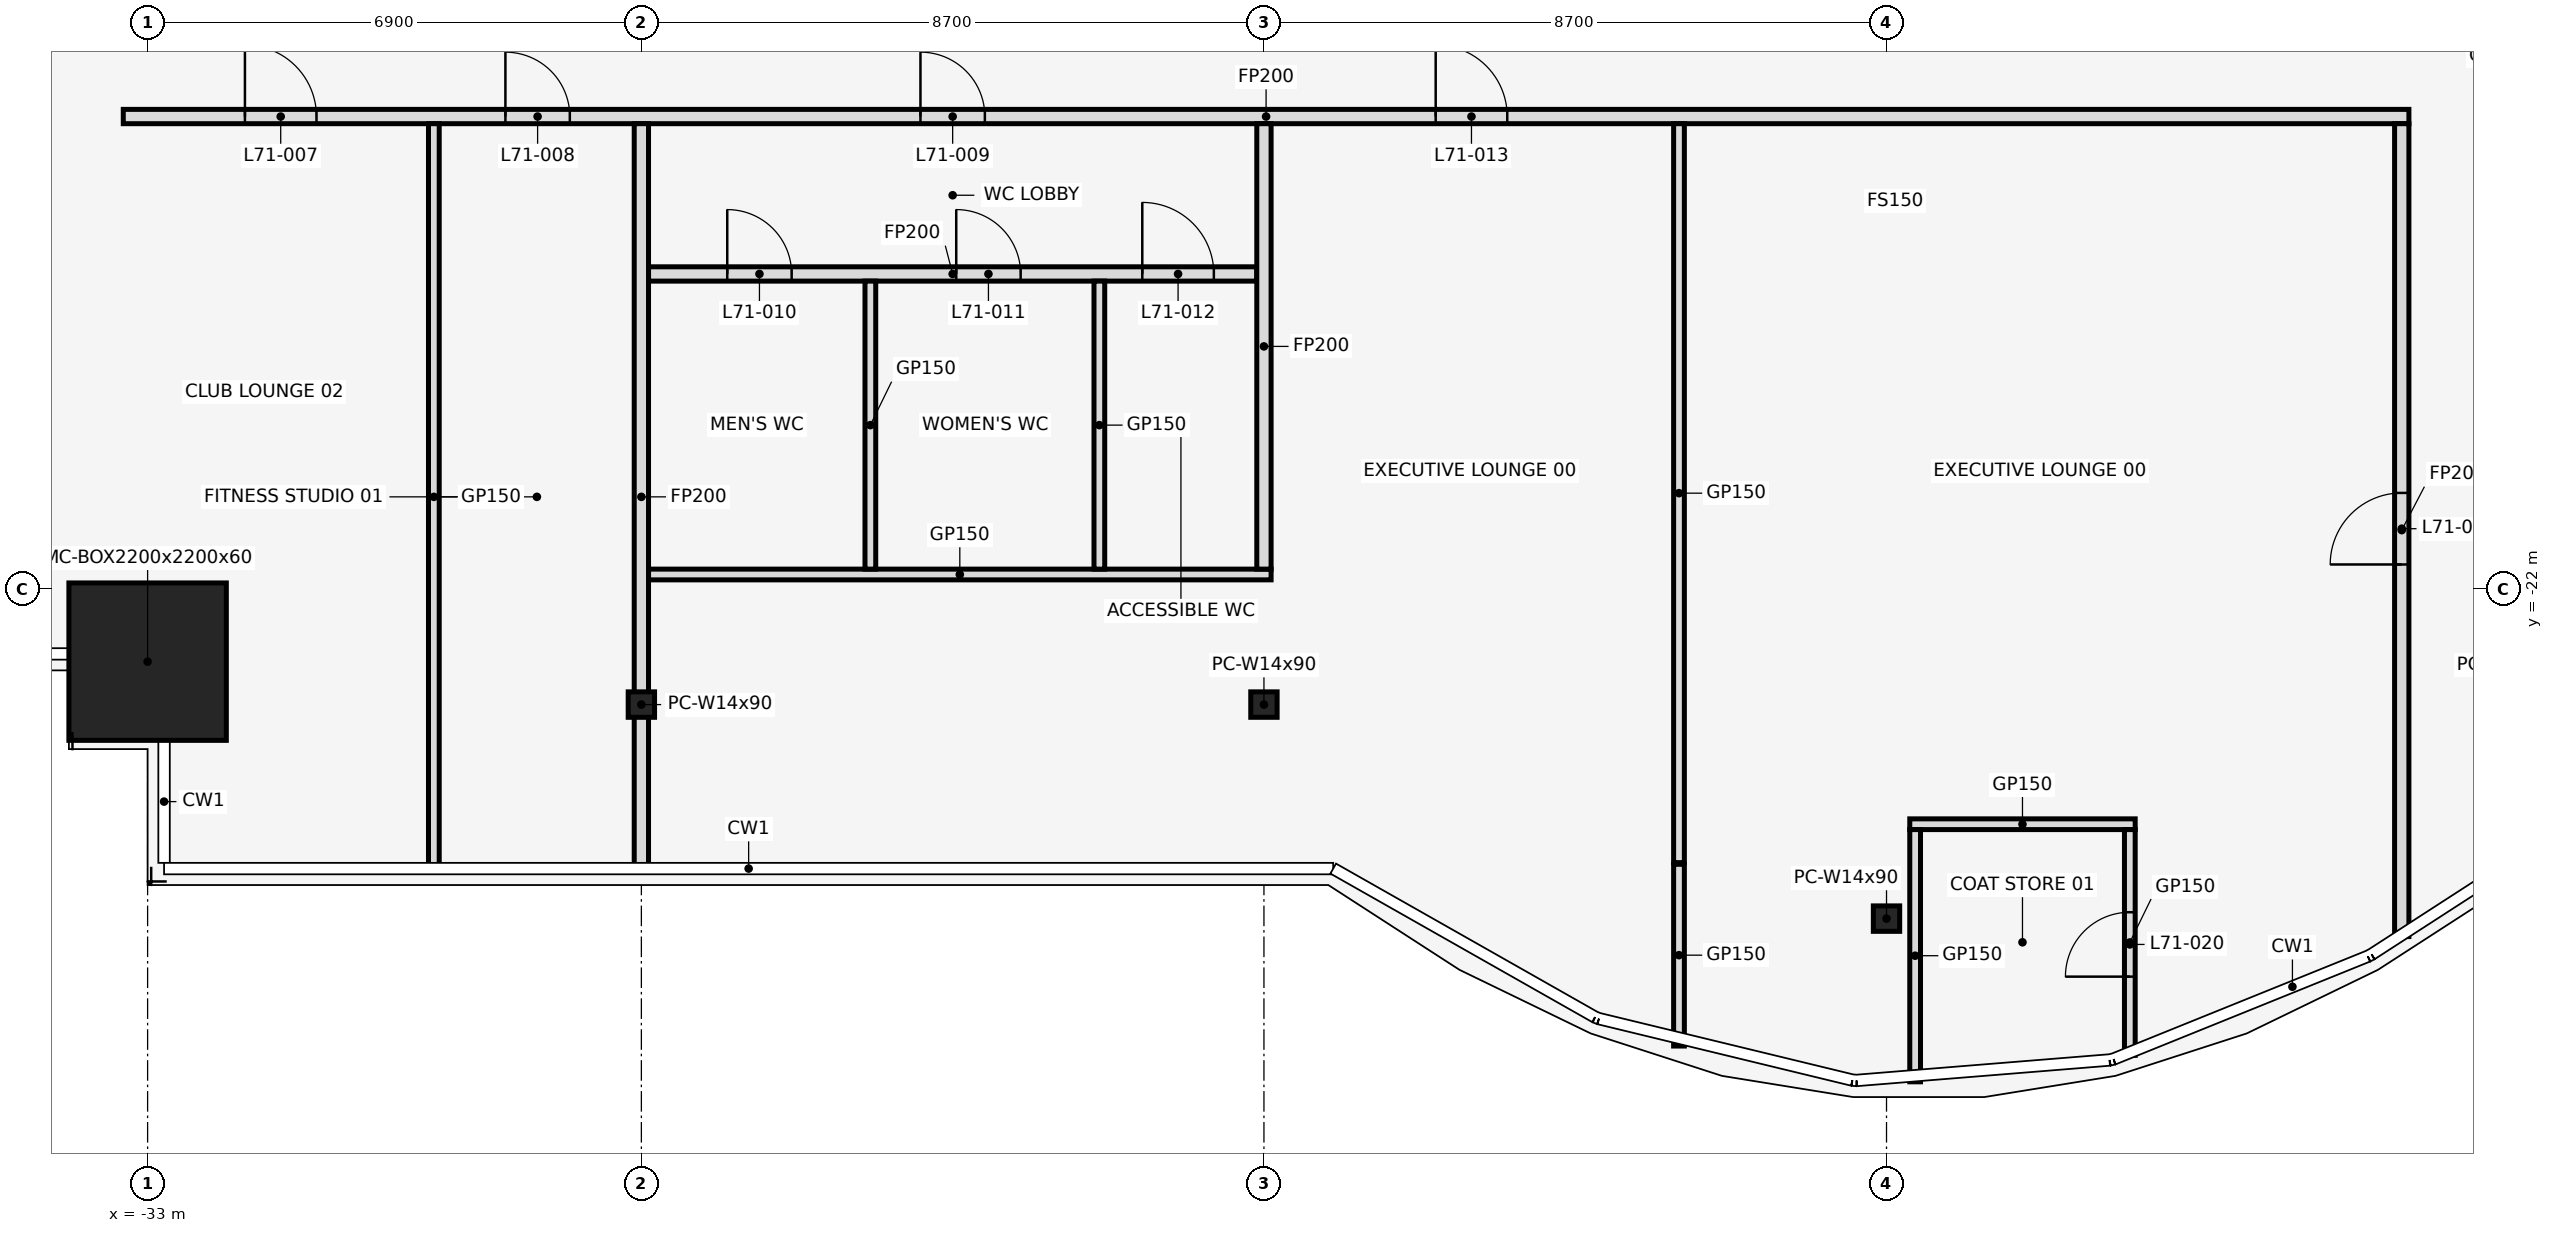
"""IFC4 building model, lengths in metres.
Left out: names, types, materials, properties, quantities, classifications, styles, units other than length and angle.
Written with IfcOpenShell. Run it as: python <this file> out.ifc"""

import sys

from ifc_helpers import new_model, si_unit, direction, frame, frame_2d, origin, origin_2d, place, context, subcontext, project, spatial, rectangle, hollow_rectangle, i_section, extrude, element, fill, save


model = new_model("IFC4")
c1 = context("Model", 3, precision=1e-05, world=origin(), true_north=direction((0.0, 1.0)))
c2 = subcontext(c1, "Body", "Model", "MODEL_VIEW")
j1 = project(units=[si_unit("LENGTHUNIT", "METRE"), si_unit("PLANEANGLEUNIT", "RADIAN")], contexts=[c1])
p1 = place(None, origin())
s1 = spatial("IfcSite", under=j1, at=p1, CompositionType="ELEMENT")
p2 = place(p1, origin())
s2 = spatial("IfcBuilding", under=s1, at=p2, CompositionType="ELEMENT")
p3 = place(p2, frame((0.0, 0.0, 315.5)))
s3 = spatial("IfcBuildingStorey", under=s2, at=p3, CompositionType="ELEMENT", Elevation=315.5)
p4 = place(p3, frame((-33.0, -23.018, 0.0), z_axis=(0.0, 0.0, 1.0), x_axis=(1.0, 0.0, 0.0)))
e1 = element("IfcColumn", 1, at=p4, inside=s3, PredefinedType="COLUMN", context=c2, shape_type="SweptSolid", body=[
    extrude(hollow_rectangle(XDim=2.2, YDim=2.2, WallThickness=0.06, at=origin_2d()), origin(), (0.0, 0.0, 1.0), 4.5),
])
for number, where, z_axis, x_axis in (
    (2, (-26.1, -23.618, 0.0), (0.0, 0.0, 1.0), (1.0, 0.0, 0.0)),
    (3, (-17.4, -23.618, 0.0), (0.0, 0.0, 1.0), (1.0, 0.0, 0.0)),
    (4, (-8.7, -26.609, 0.0), (0.0, 0.0, 1.0), (1.0, 0.0, 0.0)),
):
    element("IfcColumn", number, at=place(p3, frame(where, z_axis=z_axis, x_axis=x_axis)), inside=s3, PredefinedType="COLUMN", context=c2, shape_type="SweptSolid", body=[
        extrude(i_section(OverallWidth=0.368, OverallDepth=0.356, WebThickness=0.011, FlangeThickness=0.018, at=origin_2d()), origin(), (0.0, 0.0, 1.0), 4.5),
    ])
p5 = place(p3, frame((-8.375, -25.29, 0.0), z_axis=(0.0, 0.0, 1.0), x_axis=(1.0, 0.0, 0.0)))
e5 = element("IfcWall", 5, at=p5, inside=s3, PredefinedType="PARTITIONING", context=c2, shape_type="SweptSolid", body=[
    extrude(rectangle(XDim=3.15, YDim=0.15, at=frame_2d((1.575, 0.0))), origin(), (0.0, 0.0, 1.0), 3.418),
])
p6 = place(p3, frame((-26.0, -21.8, 0.0), z_axis=(0.0, 0.0, 1.0), x_axis=(1.0, 0.0, 0.0)))
e6 = element("IfcWall", 6, at=p6, inside=s3, PredefinedType="PARTITIONING", context=c2, shape_type="SweptSolid", body=[
    extrude(rectangle(XDim=8.7, YDim=0.15, at=frame_2d((4.35, 0.0))), origin(), (0.0, 0.0, 1.0), 3.418),
])
p7 = place(p3, frame((-26.0, -17.6, 0.0), z_axis=(0.0, 0.0, 1.0), x_axis=(1.0, 0.0, 0.0)))
e7 = element("IfcWall", 7, at=p7, inside=s3, PredefinedType="PARTITIONING", context=c2, shape_type="SweptSolid", body=[
    extrude(rectangle(XDim=8.5, YDim=0.2, at=frame_2d((4.25, 0.0))), origin(), (0.0, 0.0, 1.0), 3.418),
])
p8 = place(p7, frame((1.1, 0.0, 0.0)))
e8 = element("IfcOpeningElement", 8, at=p8, cuts=e7, PredefinedType="OPENING", context=c2, shape_type="SweptSolid", body=[
    extrude(rectangle(XDim=0.9, YDim=2.1, at=frame_2d((0.45, 1.05))), frame((0.0, 0.112, 0.0), z_axis=(0.0, -1.0, 0.0), x_axis=(1.0, 0.0, 0.0)), (0.0, 0.0, 1.0), 0.224),
])
p9 = place(p7, frame((4.3, 0.0, 0.0)))
e9 = element("IfcOpeningElement", 9, at=p9, cuts=e7, PredefinedType="OPENING", context=c2, shape_type="SweptSolid", body=[
    extrude(rectangle(XDim=0.9, YDim=2.1, at=frame_2d((0.45, 1.05))), frame((0.0, 0.112, 0.0), z_axis=(0.0, -1.0, 0.0), x_axis=(1.0, 0.0, 0.0)), (0.0, 0.0, 1.0), 0.224),
])
p10 = place(p7, frame((6.9, 0.0, 0.0)))
e10 = element("IfcOpeningElement", 10, at=p10, cuts=e7, PredefinedType="OPENING", context=c2, shape_type="SweptSolid", body=[
    extrude(rectangle(XDim=1.0, YDim=2.1, at=frame_2d((0.5, 1.05))), frame((0.0, 0.112, 0.0), z_axis=(0.0, -1.0, 0.0), x_axis=(1.0, 0.0, 0.0)), (0.0, 0.0, 1.0), 0.224),
])
p11 = place(p3, frame((-33.34, -15.4, 0.0), z_axis=(0.0, 0.0, 1.0), x_axis=(1.0, 0.0, 0.0)))
e11 = element("IfcWall", 11, at=p11, inside=s3, PredefinedType="PARTITIONING", context=c2, shape_type="SweptSolid", body=[
    extrude(rectangle(XDim=31.94, YDim=0.2, at=frame_2d((15.97, 0.0))), origin(), (0.0, 0.0, 1.0), 3.418),
])
p12 = place(p11, frame((1.7, 0.0, 0.0)))
e12 = element("IfcOpeningElement", 12, at=p12, cuts=e11, PredefinedType="OPENING", context=c2, shape_type="SweptSolid", body=[
    extrude(rectangle(XDim=1.0, YDim=2.1, at=frame_2d((0.5, 1.05))), frame((0.0, 0.112, 0.0), z_axis=(0.0, -1.0, 0.0), x_axis=(1.0, 0.0, 0.0)), (0.0, 0.0, 1.0), 0.224),
])
p13 = place(p11, frame((5.34, 0.0, 0.0)))
e13 = element("IfcOpeningElement", 13, at=p13, cuts=e11, PredefinedType="OPENING", context=c2, shape_type="SweptSolid", body=[
    extrude(rectangle(XDim=0.9, YDim=2.1, at=frame_2d((0.45, 1.05))), frame((0.0, 0.112, 0.0), z_axis=(0.0, -1.0, 0.0), x_axis=(1.0, 0.0, 0.0)), (0.0, 0.0, 1.0), 0.224),
])
p14 = place(p11, frame((11.14, 0.0, 0.0)))
e14 = element("IfcOpeningElement", 14, at=p14, cuts=e11, PredefinedType="OPENING", context=c2, shape_type="SweptSolid", body=[
    extrude(rectangle(XDim=0.9, YDim=2.1, at=frame_2d((0.45, 1.05))), frame((0.0, 0.112, 0.0), z_axis=(0.0, -1.0, 0.0), x_axis=(1.0, 0.0, 0.0)), (0.0, 0.0, 1.0), 0.224),
])
p15 = place(p11, frame((18.34, 0.0, 0.0)))
e15 = element("IfcOpeningElement", 15, at=p15, cuts=e11, PredefinedType="OPENING", context=c2, shape_type="SweptSolid", body=[
    extrude(rectangle(XDim=1.0, YDim=2.1, at=frame_2d((0.5, 1.05))), frame((0.0, 0.112, 0.0), z_axis=(0.0, -1.0, 0.0), x_axis=(1.0, 0.0, 0.0)), (0.0, 0.0, 1.0), 0.224),
])
p16 = place(p3, frame((-29.0, -25.93, 0.0), z_axis=(0.0, 0.0, 1.0), x_axis=(0.0, 1.0, 0.0)))
e16 = element("IfcWall", 16, at=p16, inside=s3, PredefinedType="PARTITIONING", context=c2, shape_type="SweptSolid", body=[
    extrude(rectangle(XDim=10.43, YDim=0.15, at=frame_2d((5.215, 0.0))), origin(), (0.0, 0.0, 1.0), 3.418),
])
p17 = place(p3, frame((-26.1, -25.93, 0.0), z_axis=(0.0, 0.0, 1.0), x_axis=(0.0, 1.0, 0.0)))
e17 = element("IfcWall", 17, at=p17, inside=s3, PredefinedType="PARTITIONING", context=c2, shape_type="SweptSolid", body=[
    extrude(rectangle(XDim=10.43, YDim=0.2, at=frame_2d((5.215, 0.0))), origin(), (0.0, 0.0, 1.0), 3.418),
])
for number, where, z_axis, x_axis in (
    (18, (-22.9, -21.725, 0.0), (0.0, 0.0, 1.0), (0.0, 1.0, 0.0)),
    (19, (-19.7, -21.725, 0.0), (0.0, 0.0, 1.0), (0.0, 1.0, 0.0)),
):
    element("IfcWall", number, at=place(p3, frame(where, z_axis=z_axis, x_axis=x_axis)), inside=s3, PredefinedType="PARTITIONING", context=c2, shape_type="SweptSolid", body=[
        extrude(rectangle(XDim=4.025, YDim=0.15, at=frame_2d((2.013, 0.0))), origin(), (0.0, 0.0, 1.0), 3.418),
    ])
p18 = place(p3, frame((-17.4, -21.725, 0.0), z_axis=(0.0, 0.0, 1.0), x_axis=(0.0, 1.0, 0.0)))
e20 = element("IfcWall", 20, at=p18, inside=s3, PredefinedType="PARTITIONING", context=c2, shape_type="SweptSolid", body=[
    extrude(rectangle(XDim=6.225, YDim=0.2, at=frame_2d((3.113, 0.0))), origin(), (0.0, 0.0, 1.0), 3.418),
])
p19 = place(p3, frame((-11.6, -28.39, 0.0), z_axis=(0.0, 0.0, 1.0), x_axis=(0.0, 1.0, 0.0)))
e21 = element("IfcWall", 21, at=p19, inside=s3, PredefinedType="PARTITIONING", context=c2, shape_type="SweptSolid", body=[
    extrude(rectangle(XDim=2.54, YDim=0.15, at=frame_2d((1.27, 0.0))), origin(), (0.0, 0.0, 1.0), 3.418),
])
p20 = place(p3, frame((-11.6, -25.827, 0.0), z_axis=(0.0, 0.0, 1.0), x_axis=(0.0, 1.0, 0.0)))
e22 = element("IfcWall", 22, at=p20, inside=s3, PredefinedType="PARTITIONING", context=c2, shape_type="SweptSolid", body=[
    extrude(rectangle(XDim=10.327, YDim=0.15, at=frame_2d((5.164, 0.0))), origin(), (0.0, 0.0, 1.0), 3.418),
])
p21 = place(p3, frame((-8.3, -28.89, 0.0), z_axis=(0.0, 0.0, 1.0), x_axis=(0.0, 1.0, 0.0)))
e23 = element("IfcWall", 23, at=p21, inside=s3, PredefinedType="PARTITIONING", context=c2, shape_type="SweptSolid", body=[
    extrude(rectangle(XDim=3.525, YDim=0.15, at=frame_2d((1.762, 0.0))), origin(), (0.0, 0.0, 1.0), 3.418),
])
p22 = place(p3, frame((-5.3, -28.52, 0.0), z_axis=(0.0, 0.0, 1.0), x_axis=(0.0, 1.0, 0.0)))
e24 = element("IfcWall", 24, at=p22, inside=s3, PredefinedType="PARTITIONING", context=c2, shape_type="SweptSolid", body=[
    extrude(rectangle(XDim=3.155, YDim=0.15, at=frame_2d((1.578, 0.0))), origin(), (0.0, 0.0, 1.0), 3.418),
])
p23 = place(p22, frame((1.1, 0.0, 0.0)))
e25 = element("IfcOpeningElement", 25, at=p23, cuts=e24, PredefinedType="OPENING", context=c2, shape_type="SweptSolid", body=[
    extrude(rectangle(XDim=0.9, YDim=2.1, at=frame_2d((0.45, 1.05))), frame((0.0, 0.087, 0.0), z_axis=(0.0, -1.0, 0.0), x_axis=(1.0, 0.0, 0.0)), (0.0, 0.0, 1.0), 0.174),
])
p24 = place(p3, frame((-1.5, -26.86, 0.0), z_axis=(0.0, 0.0, 1.0), x_axis=(0.0, 1.0, 0.0)))
e26 = element("IfcWall", 26, at=p24, inside=s3, PredefinedType="PARTITIONING", context=c2, shape_type="SweptSolid", body=[
    extrude(rectangle(XDim=11.36, YDim=0.2, at=frame_2d((5.68, 0.0))), origin(), (0.0, 0.0, 1.0), 3.418),
])
p25 = place(p24, frame((5.2, 0.0, 0.0)))
e27 = element("IfcOpeningElement", 27, at=p25, cuts=e26, PredefinedType="OPENING", context=c2, shape_type="SweptSolid", body=[
    extrude(rectangle(XDim=1.0, YDim=2.1, at=frame_2d((0.5, 1.05))), frame((0.0, 0.112, 0.0), z_axis=(0.0, -1.0, 0.0), x_axis=(1.0, 0.0, 0.0)), (0.0, 0.0, 1.0), 0.224),
])
p26 = place(p12, frame((1.0, 0.0, 0.0), z_axis=(0.0, 0.0, 1.0), x_axis=(-1.0, 0.0, 0.0)))
e28 = element("IfcDoor", 28, at=p26, inside=s3, OperationType="SINGLE_SWING_LEFT", PredefinedType="DOOR", context=c2, shape_type="SweptSolid", body=[
    extrude(rectangle(XDim=1.0, YDim=2.1, at=frame_2d((0.5, 1.05))), frame((0.0, 0.025, 0.0), z_axis=(0.0, -1.0, 0.0), x_axis=(1.0, 0.0, 0.0)), (0.0, 0.0, 1.0), 0.05),
])
fill(e12, e28)
p27 = place(p13, frame((0.9, 0.0, 0.0), z_axis=(0.0, 0.0, 1.0), x_axis=(-1.0, 0.0, 0.0)))
e29 = element("IfcDoor", 29, at=p27, inside=s3, OperationType="SINGLE_SWING_RIGHT", PredefinedType="DOOR", context=c2, shape_type="SweptSolid", body=[
    extrude(rectangle(XDim=0.9, YDim=2.1, at=frame_2d((0.45, 1.05))), frame((0.0, 0.025, 0.0), z_axis=(0.0, -1.0, 0.0), x_axis=(1.0, 0.0, 0.0)), (0.0, 0.0, 1.0), 0.05),
])
fill(e13, e29)
p28 = place(p14, frame((0.9, 0.0, 0.0), z_axis=(0.0, 0.0, 1.0), x_axis=(-1.0, 0.0, 0.0)))
e30 = element("IfcDoor", 30, at=p28, inside=s3, OperationType="SINGLE_SWING_RIGHT", PredefinedType="DOOR", context=c2, shape_type="SweptSolid", body=[
    extrude(rectangle(XDim=0.9, YDim=2.1, at=frame_2d((0.45, 1.05))), frame((0.0, 0.025, 0.0), z_axis=(0.0, -1.0, 0.0), x_axis=(1.0, 0.0, 0.0)), (0.0, 0.0, 1.0), 0.05),
])
fill(e14, e30)
p29 = place(p8, frame((0.9, 0.0, 0.0), z_axis=(0.0, 0.0, 1.0), x_axis=(-1.0, 0.0, 0.0)))
e31 = element("IfcDoor", 31, at=p29, inside=s3, OperationType="SINGLE_SWING_LEFT", PredefinedType="DOOR", context=c2, shape_type="SweptSolid", body=[
    extrude(rectangle(XDim=0.9, YDim=2.1, at=frame_2d((0.45, 1.05))), frame((0.0, 0.025, 0.0), z_axis=(0.0, -1.0, 0.0), x_axis=(1.0, 0.0, 0.0)), (0.0, 0.0, 1.0), 0.05),
])
fill(e8, e31)
p30 = place(p9, frame((0.9, 0.0, 0.0), z_axis=(0.0, 0.0, 1.0), x_axis=(-1.0, 0.0, 0.0)))
e32 = element("IfcDoor", 32, at=p30, inside=s3, OperationType="SINGLE_SWING_RIGHT", PredefinedType="DOOR", context=c2, shape_type="SweptSolid", body=[
    extrude(rectangle(XDim=0.9, YDim=2.1, at=frame_2d((0.45, 1.05))), frame((0.0, 0.025, 0.0), z_axis=(0.0, -1.0, 0.0), x_axis=(1.0, 0.0, 0.0)), (0.0, 0.0, 1.0), 0.05),
])
fill(e9, e32)
p31 = place(p10, frame((1.0, 0.0, 0.0), z_axis=(0.0, 0.0, 1.0), x_axis=(-1.0, 0.0, 0.0)))
e33 = element("IfcDoor", 33, at=p31, inside=s3, OperationType="SINGLE_SWING_RIGHT", PredefinedType="DOOR", context=c2, shape_type="SweptSolid", body=[
    extrude(rectangle(XDim=1.0, YDim=2.1, at=frame_2d((0.5, 1.05))), frame((0.0, 0.025, 0.0), z_axis=(0.0, -1.0, 0.0), x_axis=(1.0, 0.0, 0.0)), (0.0, 0.0, 1.0), 0.05),
])
fill(e10, e33)
p32 = place(p15, frame((1.0, 0.0, 0.0), z_axis=(0.0, 0.0, 1.0), x_axis=(-1.0, 0.0, 0.0)))
e34 = element("IfcDoor", 34, at=p32, inside=s3, OperationType="SINGLE_SWING_LEFT", PredefinedType="DOOR", context=c2, shape_type="SweptSolid", body=[
    extrude(rectangle(XDim=1.0, YDim=2.1, at=frame_2d((0.5, 1.05))), frame((0.0, 0.025, 0.0), z_axis=(0.0, -1.0, 0.0), x_axis=(1.0, 0.0, 0.0)), (0.0, 0.0, 1.0), 0.05),
])
fill(e15, e34)
p33 = place(p25, origin())
e35 = element("IfcDoor", 35, at=p33, inside=s3, OperationType="SINGLE_SWING_LEFT", PredefinedType="DOOR", context=c2, shape_type="SweptSolid", body=[
    extrude(rectangle(XDim=1.0, YDim=2.1, at=frame_2d((0.5, 1.05))), frame((0.0, 0.025, 0.0), z_axis=(0.0, -1.0, 0.0), x_axis=(1.0, 0.0, 0.0)), (0.0, 0.0, 1.0), 0.05),
])
fill(e27, e35)
p34 = place(p23, origin())
e36 = element("IfcDoor", 36, at=p34, inside=s3, OperationType="SINGLE_SWING_LEFT", PredefinedType="DOOR", context=c2, shape_type="SweptSolid", body=[
    extrude(rectangle(XDim=0.9, YDim=2.1, at=frame_2d((0.45, 1.05))), frame((0.0, 0.025, 0.0), z_axis=(0.0, -1.0, 0.0), x_axis=(1.0, 0.0, 0.0)), (0.0, 0.0, 1.0), 0.05),
])
fill(e25, e36)
save(model, sys.argv[1])
